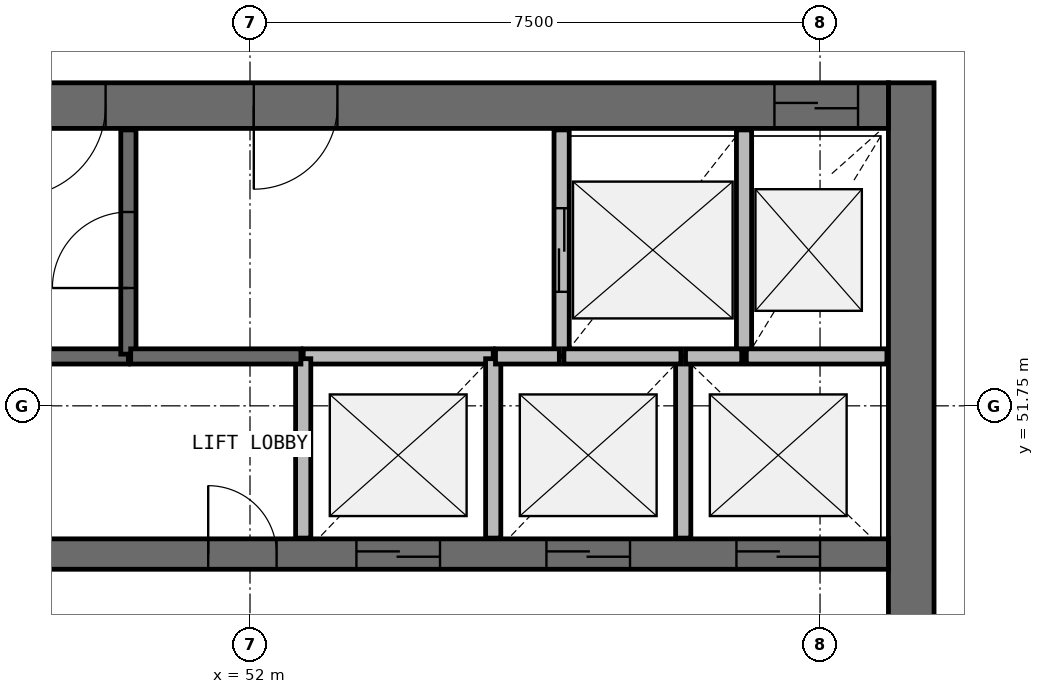
"""IFC4 building model, lengths in metres.
Left out: names, types, materials, properties, quantities, classifications, styles, units other than length and angle.
Written with IfcOpenShell. Run it as: python <this file> out.ifc"""

import sys

from ifc_helpers import new_model, si_unit, direction, frame, frame_2d, origin, place, context, subcontext, project, spatial, rectangle, extrude, source, transform, mapped, element, fill, save


model = new_model("IFC4")
c1 = context("Model", 3, precision=1e-05, world=origin(), true_north=direction((0.0, 1.0)))
c2 = subcontext(c1, "Body", "Model", "MODEL_VIEW")
j1 = project(units=[si_unit("LENGTHUNIT", "METRE"), si_unit("PLANEANGLEUNIT", "RADIAN")], contexts=[c1])
p1 = place(None, origin())
s1 = spatial("IfcSite", under=j1, at=p1, CompositionType="ELEMENT")
p2 = place(p1, origin())
s2 = spatial("IfcBuilding", under=s1, at=p2, CompositionType="ELEMENT")
p3 = place(p2, frame((0.0, 0.0, 254.0)))
s3 = spatial("IfcBuildingStorey", under=s2, at=p3, CompositionType="ELEMENT", Elevation=254.0)
p4 = place(p3, frame((60.7, 40.0, 0.0), z_axis=(0.0, 0.0, 1.0), x_axis=(0.0, 1.0, 0.0)))
e1 = element("IfcWall", 1, at=p4, inside=s3, PredefinedType="SHEAR", context=c2, shape_type="SweptSolid", body=[
    extrude(rectangle(XDim=16.0, YDim=0.6, at=frame_2d((8.0, 0.0))), origin(), (0.0, 0.0, 1.0), 3.9),
])
p5 = place(p4, frame((7.1, 0.0, 0.0)))
e2 = element("IfcOpeningElement", 2, at=p5, cuts=e1, PredefinedType="OPENING", context=c2, shape_type="SweptSolid", body=[
    extrude(rectangle(XDim=1.8, YDim=2.1, at=frame_2d((0.9, 1.05))), frame((0.0, 0.31, 0.0), z_axis=(0.0, -1.0, 0.0), x_axis=(1.0, 0.0, 0.0)), (0.0, 0.0, 1.0), 0.62),
])
p6 = place(p3, frame((60.4, 55.7, 0.0), z_axis=(0.0, 0.0, 1.0), x_axis=(-1.0, 0.0, 0.0)))
e3 = element("IfcWall", 3, at=p6, inside=s3, PredefinedType="SHEAR", context=c2, shape_type="SweptSolid", body=[
    extrude(rectangle(XDim=16.8, YDim=0.6, at=frame_2d((8.4, 0.0))), origin(), (0.0, 0.0, 1.0), 3.9),
])
p7 = place(p6, frame((0.4, 0.0, 0.0)))
e4 = element("IfcOpeningElement", 4, at=p7, cuts=e3, PredefinedType="OPENING", context=c2, shape_type="SweptSolid", body=[
    extrude(rectangle(XDim=1.1, YDim=2.1, at=frame_2d((0.55, 1.05))), frame((0.0, 0.31, 0.0), z_axis=(0.0, -1.0, 0.0), x_axis=(1.0, 0.0, 0.0)), (0.0, 0.0, 1.0), 0.62),
])
p8 = place(p6, frame((10.3, 0.0, 0.0)))
e5 = element("IfcOpeningElement", 5, at=p8, cuts=e3, PredefinedType="OPENING", context=c2, shape_type="SweptSolid", body=[
    extrude(rectangle(XDim=1.2, YDim=2.1, at=frame_2d((0.6, 1.05))), frame((0.0, 0.31, 0.0), z_axis=(0.0, -1.0, 0.0), x_axis=(1.0, 0.0, 0.0)), (0.0, 0.0, 1.0), 0.62),
])
p9 = place(p6, frame((7.25, 0.0, 0.0)))
e6 = element("IfcOpeningElement", 6, at=p9, cuts=e3, PredefinedType="OPENING", context=c2, shape_type="SweptSolid", body=[
    extrude(rectangle(XDim=1.1, YDim=2.1, at=frame_2d((0.55, 1.05))), frame((0.0, 0.31, 0.0), z_axis=(0.0, -1.0, 0.0), x_axis=(1.0, 0.0, 0.0)), (0.0, 0.0, 1.0), 0.62),
])
p10 = place(p3, frame((43.6, 49.8, 0.0), z_axis=(0.0, 0.0, 1.0), x_axis=(1.0, 0.0, 0.0)))
e7 = element("IfcWall", 7, at=p10, inside=s3, PredefinedType="SHEAR", context=c2, shape_type="SweptSolid", body=[
    extrude(rectangle(XDim=16.8, YDim=0.4, at=frame_2d((8.4, 0.0))), origin(), (0.0, 0.0, 1.0), 3.9),
])
p11 = place(p10, frame((9.8, 0.0, 0.0)))
e8 = element("IfcOpeningElement", 8, at=p11, cuts=e7, PredefinedType="OPENING", context=c2, shape_type="SweptSolid", body=[
    extrude(rectangle(XDim=1.1, YDim=2.1, at=frame_2d((0.55, 1.05))), frame((0.0, 0.21, 0.0), z_axis=(0.0, -1.0, 0.0), x_axis=(1.0, 0.0, 0.0)), (0.0, 0.0, 1.0), 0.42),
])
p12 = place(p10, frame((12.3, 0.0, 0.0)))
e9 = element("IfcOpeningElement", 9, at=p12, cuts=e7, PredefinedType="OPENING", context=c2, shape_type="SweptSolid", body=[
    extrude(rectangle(XDim=1.1, YDim=2.1, at=frame_2d((0.55, 1.05))), frame((0.0, 0.21, 0.0), z_axis=(0.0, -1.0, 0.0), x_axis=(1.0, 0.0, 0.0)), (0.0, 0.0, 1.0), 0.42),
])
p13 = place(p10, frame((14.8, 0.0, 0.0)))
e10 = element("IfcOpeningElement", 10, at=p13, cuts=e7, PredefinedType="OPENING", context=c2, shape_type="SweptSolid", body=[
    extrude(rectangle(XDim=1.1, YDim=2.1, at=frame_2d((0.55, 1.05))), frame((0.0, 0.21, 0.0), z_axis=(0.0, -1.0, 0.0), x_axis=(1.0, 0.0, 0.0)), (0.0, 0.0, 1.0), 0.42),
])
p14 = place(p10, frame((4.45, 0.0, 0.0)))
e11 = element("IfcOpeningElement", 11, at=p14, cuts=e7, PredefinedType="OPENING", context=c2, shape_type="SweptSolid", body=[
    extrude(rectangle(XDim=0.9, YDim=2.1, at=frame_2d((0.45, 1.05))), frame((0.0, 0.21, 0.0), z_axis=(0.0, -1.0, 0.0), x_axis=(1.0, 0.0, 0.0)), (0.0, 0.0, 1.0), 0.42),
])
p15 = place(p10, frame((7.85, 0.0, 0.0)))
e12 = element("IfcOpeningElement", 12, at=p15, cuts=e7, PredefinedType="OPENING", context=c2, shape_type="SweptSolid", body=[
    extrude(rectangle(XDim=0.9, YDim=2.1, at=frame_2d((0.45, 1.05))), frame((0.0, 0.21, 0.0), z_axis=(0.0, -1.0, 0.0), x_axis=(1.0, 0.0, 0.0)), (0.0, 0.0, 1.0), 0.42),
])
p16 = place(p3, frame((43.62, 52.4, 0.0), z_axis=(0.0, 0.0, 1.0), x_axis=(1.0, 0.0, 0.0)))
e13 = element("IfcWall", 13, at=p16, inside=s3, PredefinedType="SOLIDWALL", context=c2, shape_type="SweptSolid", body=[
    extrude(rectangle(XDim=6.78, YDim=0.2, at=frame_2d((3.39, 0.0))), origin(), (0.0, 0.0, 1.0), 3.58),
])
p17 = place(p3, frame((50.4, 52.43, 0.0), z_axis=(0.0, 0.0, 1.0), x_axis=(0.0, 1.0, 0.0)))
e14 = element("IfcWall", 14, at=p17, inside=s3, PredefinedType="SOLIDWALL", context=c2, shape_type="SweptSolid", body=[
    extrude(rectangle(XDim=2.95, YDim=0.2, at=frame_2d((1.475, 0.0))), origin(), (0.0, 0.0, 1.0), 3.58),
])
p18 = place(p17, frame((0.87, 0.0, 0.0)))
e15 = element("IfcOpeningElement", 15, at=p18, cuts=e14, PredefinedType="OPENING", context=c2, shape_type="SweptSolid", body=[
    extrude(rectangle(XDim=1.0, YDim=2.1, at=frame_2d((0.5, 1.05))), frame((0.0, 0.11, 0.0), z_axis=(0.0, -1.0, 0.0), x_axis=(1.0, 0.0, 0.0)), (0.0, 0.0, 1.0), 0.22),
])
p19 = place(p3, frame((56.1, 55.38, 0.0), z_axis=(0.0, 0.0, 1.0), x_axis=(0.0, -1.0, 0.0)))
e16 = element("IfcWall", 16, at=p19, inside=s3, PredefinedType="SOLIDWALL", context=c2, shape_type="SweptSolid", body=[
    extrude(rectangle(XDim=2.98, YDim=0.2, at=frame_2d((1.49, 0.0))), origin(), (0.0, 0.0, 1.0), 3.58),
])
p20 = place(p19, frame((1.03, 0.0, 0.0)))
e17 = element("IfcOpeningElement", 17, at=p20, cuts=e16, PredefinedType="OPENING", context=c2, shape_type="SweptSolid", body=[
    extrude(rectangle(XDim=1.1, YDim=2.1, at=frame_2d((0.55, 1.05))), frame((0.0, 0.11, 0.0), z_axis=(0.0, -1.0, 0.0), x_axis=(1.0, 0.0, 0.0)), (0.0, 0.0, 1.0), 0.22),
])
p21 = place(p3, frame((58.5, 52.4, 0.0), z_axis=(0.0, 0.0, 1.0), x_axis=(0.0, 1.0, 0.0)))
e18 = element("IfcWall", 18, at=p21, inside=s3, PredefinedType="SOLIDWALL", context=c2, shape_type="SweptSolid", body=[
    extrude(rectangle(XDim=2.98, YDim=0.2, at=frame_2d((1.49, 0.0))), origin(), (0.0, 0.0, 1.0), 3.58),
])
p22 = place(p3, frame((55.2, 52.4, 0.0), z_axis=(0.0, 0.0, 1.0), x_axis=(-1.0, 0.0, 0.0)))
e19 = element("IfcWall", 19, at=p22, inside=s3, PredefinedType="SOLIDWALL", context=c2, shape_type="SweptSolid", body=[
    extrude(rectangle(XDim=2.5, YDim=0.2, at=frame_2d((1.25, 0.0))), origin(), (0.0, 0.0, 1.0), 3.58),
])
for number, where, z_axis, x_axis in (
    (20, (52.7, 52.37, 0.0), (0.0, 0.0, 1.0), (0.0, -1.0, 0.0)),
    (21, (55.2, 50.01, 0.0), (0.0, 0.0, 1.0), (0.0, 1.0, 0.0)),
):
    element("IfcWall", number, at=place(p3, frame(where, z_axis=z_axis, x_axis=x_axis)), inside=s3, PredefinedType="SOLIDWALL", context=c2, shape_type="SweptSolid", body=[
        extrude(rectangle(XDim=2.36, YDim=0.2, at=frame_2d((1.18, 0.0))), origin(), (0.0, 0.0, 1.0), 3.58),
    ])
p23 = place(p3, frame((57.7, 50.01, 0.0), z_axis=(0.0, 0.0, 1.0), x_axis=(0.0, 1.0, 0.0)))
e22 = element("IfcWall", 22, at=p23, inside=s3, PredefinedType="SOLIDWALL", context=c2, shape_type="SweptSolid", body=[
    extrude(rectangle(XDim=2.39, YDim=0.2, at=frame_2d((1.195, 0.0))), origin(), (0.0, 0.0, 1.0), 3.58),
])
p24 = place(p3, frame((50.43, 52.4, 0.0), z_axis=(0.0, 0.0, 1.0), x_axis=(1.0, 0.0, 0.0)))
e23 = element("IfcWall", 23, at=p24, inside=s3, PredefinedType="SOLIDWALL", context=c2, shape_type="SweptSolid", body=[
    extrude(rectangle(XDim=2.24, YDim=0.2, at=frame_2d((1.12, 0.0))), origin(), (0.0, 0.0, 1.0), 3.58),
])
p25 = place(p3, frame((60.38, 52.4, 0.0), z_axis=(0.0, 0.0, 1.0), x_axis=(-1.0, 0.0, 0.0)))
e24 = element("IfcWall", 24, at=p25, inside=s3, PredefinedType="SOLIDWALL", context=c2, shape_type="SweptSolid", body=[
    extrude(rectangle(XDim=1.85, YDim=0.2, at=frame_2d((0.925, 0.0))), origin(), (0.0, 0.0, 1.0), 3.58),
])
p26 = place(p3, frame((57.67, 52.4, 0.0), z_axis=(0.0, 0.0, 1.0), x_axis=(-1.0, 0.0, 0.0)))
e25 = element("IfcWall", 25, at=p26, inside=s3, PredefinedType="SOLIDWALL", context=c2, shape_type="SweptSolid", body=[
    extrude(rectangle(XDim=1.54, YDim=0.2, at=frame_2d((0.77, 0.0))), origin(), (0.0, 0.0, 1.0), 3.58),
])
p27 = place(p3, frame((56.07, 52.4, 0.0), z_axis=(0.0, 0.0, 1.0), x_axis=(-1.0, 0.0, 0.0)))
e26 = element("IfcWall", 26, at=p27, inside=s3, PredefinedType="SOLIDWALL", context=c2, shape_type="SweptSolid", body=[
    extrude(rectangle(XDim=0.84, YDim=0.2, at=frame_2d((0.42, 0.0))), origin(), (0.0, 0.0, 1.0), 3.58),
])
p28 = place(p3, frame((58.47, 52.4, 0.0), z_axis=(0.0, 0.0, 1.0), x_axis=(-1.0, 0.0, 0.0)))
e27 = element("IfcWall", 27, at=p28, inside=s3, PredefinedType="SOLIDWALL", context=c2, shape_type="SweptSolid", body=[
    extrude(rectangle(XDim=0.74, YDim=0.2, at=frame_2d((0.37, 0.0))), origin(), (0.0, 0.0, 1.0), 3.58),
])
m1 = source(origin(), c2, "Body", "SweptSolid", [
    extrude(rectangle(XDim=1.1, YDim=2.1, at=frame_2d((0.55, 1.05))), frame((0.0, 0.025, 0.0), z_axis=(0.0, -1.0, 0.0), x_axis=(1.0, 0.0, 0.0)), (0.0, 0.0, 1.0), 0.05),
])
p29 = place(p11, origin())
e28 = element("IfcDoor", 28, at=p29, inside=s3, OperationType="DOUBLE_DOOR_SLIDING", PredefinedType="USERDEFINED", context=c2, shape_type="MappedRepresentation", body=[
    mapped(m1, transform((0.0, 0.0, 0.0), scale=1.0)),
])
fill(e8, e28)
p30 = place(p12, origin())
e29 = element("IfcDoor", 29, at=p30, inside=s3, OperationType="DOUBLE_DOOR_SLIDING", PredefinedType="USERDEFINED", context=c2, shape_type="MappedRepresentation", body=[
    mapped(m1, transform((0.0, 0.0, 0.0), scale=1.0)),
])
fill(e9, e29)
p31 = place(p13, origin())
e30 = element("IfcDoor", 30, at=p31, inside=s3, OperationType="DOUBLE_DOOR_SLIDING", PredefinedType="USERDEFINED", context=c2, shape_type="MappedRepresentation", body=[
    mapped(m1, transform((0.0, 0.0, 0.0), scale=1.0)),
])
fill(e10, e30)
p32 = place(p20, origin())
e31 = element("IfcDoor", 31, at=p32, inside=s3, OperationType="DOUBLE_DOOR_SLIDING", PredefinedType="USERDEFINED", context=c2, shape_type="MappedRepresentation", body=[
    mapped(m1, transform((0.0, 0.0, 0.0), scale=1.0)),
])
fill(e17, e31)
p33 = place(p7, origin())
e32 = element("IfcDoor", 32, at=p33, inside=s3, OperationType="DOUBLE_DOOR_SLIDING", PredefinedType="USERDEFINED", context=c2, shape_type="MappedRepresentation", body=[
    mapped(m1, transform((0.0, 0.0, 0.0), scale=1.0)),
])
fill(e4, e32)
m2 = source(origin(), c2, "Body", "SweptSolid", [
    extrude(rectangle(XDim=1.2, YDim=2.1, at=frame_2d((0.6, 1.05))), frame((0.0, 0.025, 0.0), z_axis=(0.0, -1.0, 0.0), x_axis=(1.0, 0.0, 0.0)), (0.0, 0.0, 1.0), 0.05),
])
p34 = place(p8, origin())
e33 = element("IfcDoor", 33, at=p34, inside=s3, OperationType="SINGLE_SWING_RIGHT", PredefinedType="DOOR", context=c2, shape_type="MappedRepresentation", body=[
    mapped(m2, transform((0.0, 0.0, 0.0), scale=1.0)),
])
fill(e5, e33)
m3 = source(origin(), c2, "Body", "SweptSolid", [
    extrude(rectangle(XDim=1.0, YDim=2.1, at=frame_2d((0.5, 1.05))), frame((0.0, 0.025, 0.0), z_axis=(0.0, -1.0, 0.0), x_axis=(1.0, 0.0, 0.0)), (0.0, 0.0, 1.0), 0.05),
])
p35 = place(p18, origin())
e34 = element("IfcDoor", 34, at=p35, inside=s3, OperationType="SINGLE_SWING_LEFT", PredefinedType="DOOR", context=c2, shape_type="MappedRepresentation", body=[
    mapped(m3, transform((0.0, 0.0, 0.0), scale=1.0)),
])
fill(e15, e34)
m4 = source(origin(), c2, "Body", "SweptSolid", [
    extrude(rectangle(XDim=1.1, YDim=2.1, at=frame_2d((0.55, 1.05))), frame((0.0, 0.025, 0.0), z_axis=(0.0, -1.0, 0.0), x_axis=(1.0, 0.0, 0.0)), (0.0, 0.0, 1.0), 0.05),
])
p36 = place(p9, origin())
e35 = element("IfcDoor", 35, at=p36, inside=s3, OperationType="SINGLE_SWING_RIGHT", PredefinedType="DOOR", context=c2, shape_type="MappedRepresentation", body=[
    mapped(m4, transform((0.0, 0.0, 0.0), scale=1.0)),
])
fill(e6, e35)
m5 = source(origin(), c2, "Body", "SweptSolid", [
    extrude(rectangle(XDim=0.9, YDim=2.1, at=frame_2d((0.45, 1.05))), frame((0.0, 0.025, 0.0), z_axis=(0.0, -1.0, 0.0), x_axis=(1.0, 0.0, 0.0)), (0.0, 0.0, 1.0), 0.05),
])
p37 = place(p15, origin())
e36 = element("IfcDoor", 36, at=p37, inside=s3, OperationType="SINGLE_SWING_LEFT", PredefinedType="DOOR", context=c2, shape_type="MappedRepresentation", body=[
    mapped(m5, transform((0.0, 0.0, 0.0), scale=1.0)),
])
fill(e12, e36)
save(model, sys.argv[1])
